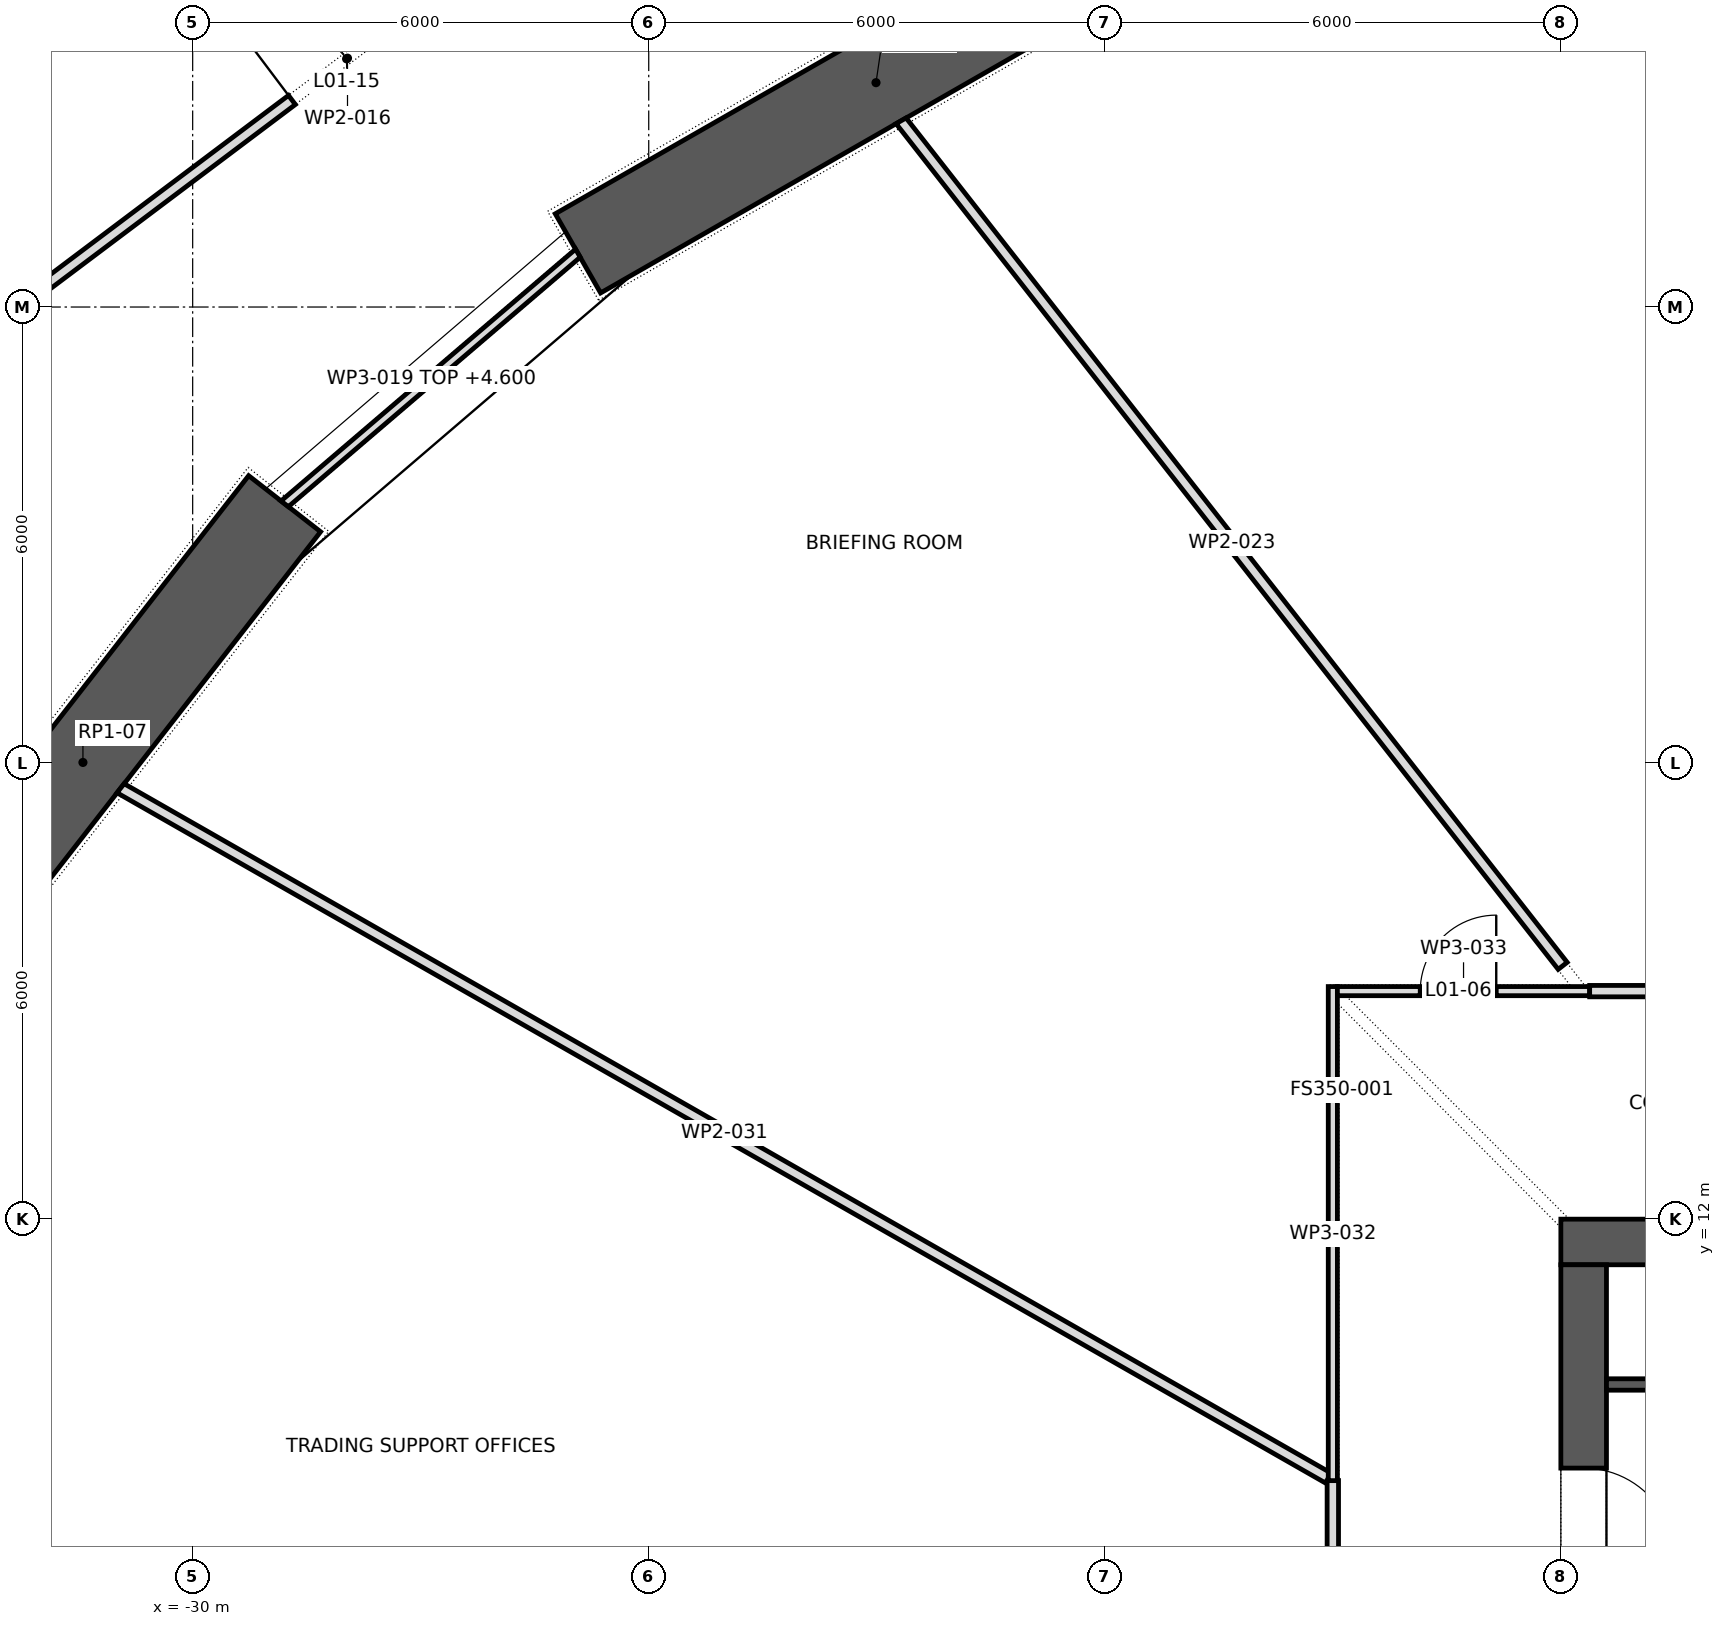
"""IFC4 building model, lengths in metres.
Left out: names, types, materials, properties, quantities, classifications, styles, units other than length and angle.
Written with IfcOpenShell. Run it as: python <this file> out.ifc"""

import sys

from ifc_helpers import new_model, si_unit, direction, frame, frame_2d, origin, place, context, subcontext, project, spatial, polyline, rectangle, outline, extrude, element, fill, save


model = new_model("IFC4")
c1 = context("Model", 3, precision=1e-05, world=origin(), true_north=direction((0.0, 1.0)))
c2 = subcontext(c1, "Body", "Model", "MODEL_VIEW")
j1 = project(units=[si_unit("LENGTHUNIT", "METRE"), si_unit("PLANEANGLEUNIT", "RADIAN")], contexts=[c1])
p1 = place(None, origin())
s1 = spatial("IfcSite", under=j1, at=p1, CompositionType="ELEMENT")
p2 = place(p1, origin())
s2 = spatial("IfcBuilding", under=s1, at=p2, CompositionType="ELEMENT")
p3 = place(p2, frame((0.0, 0.0, 7.0)))
s3 = spatial("IfcBuildingStorey", under=s2, at=p3, CompositionType="ELEMENT", Elevation=7.0)
p4 = place(p3, frame((-17.089, 29.198, 0.0), z_axis=(0.0, 0.0, 1.0), x_axis=(-0.867760656864, -0.496982336103, 0.0)))
e1 = element("IfcWall", 1, at=p4, inside=s3, PredefinedType="SHEAR", context=c2, shape_type="SweptSolid", body=[
    extrude(rectangle(XDim=9.038, YDim=1.2, at=frame_2d((4.519, 0.0))), origin(), (0.0, 0.0, 1.0), 5.5),
])
p5 = place(p3, frame((-28.79, 21.412, 0.0), z_axis=(0.0, 0.0, 1.0), x_axis=(-0.614825322247, -0.788663314174, 0.0)))
e2 = element("IfcWall", 2, at=p5, inside=s3, PredefinedType="SHEAR", context=c2, shape_type="SweptSolid", body=[
    extrude(rectangle(XDim=8.632, YDim=1.2, at=frame_2d((4.316, 0.0))), origin(), (0.0, 0.0, 1.0), 5.5),
])
p6 = place(p3, frame((-12.0, 11.7, 0.0), z_axis=(0.0, 0.0, 1.0), x_axis=(1.0, 0.0, 0.0)))
e3 = element("IfcWall", 3, at=p6, inside=s3, PredefinedType="SHEAR", context=c2, shape_type="SweptSolid", body=[
    extrude(rectangle(XDim=24.0, YDim=0.6, at=frame_2d((12.0, 0.0))), origin(), (0.0, 0.0, 1.0), 5.5),
])
p7 = place(p6, frame((9.025, 0.0, 0.0)))
e4 = element("IfcOpeningElement", 4, at=p7, cuts=e3, PredefinedType="OPENING", context=c2, shape_type="SweptSolid", body=[
    extrude(rectangle(XDim=0.8, YDim=2.1, at=frame_2d((0.4, 1.05))), frame((0.0, 0.312, 0.0), z_axis=(0.0, -1.0, 0.0), x_axis=(1.0, 0.0, 0.0)), (0.0, 0.0, 1.0), 0.624),
])
p8 = place(p6, frame((10.625, 0.0, 0.0)))
e5 = element("IfcOpeningElement", 5, at=p8, cuts=e3, PredefinedType="OPENING", context=c2, shape_type="SweptSolid", body=[
    extrude(rectangle(XDim=0.9, YDim=2.1, at=frame_2d((0.45, 1.05))), frame((0.0, 0.312, 0.0), z_axis=(0.0, -1.0, 0.0), x_axis=(1.0, 0.0, 0.0)), (0.0, 0.0, 1.0), 0.624),
])
p9 = place(p6, frame((4.2, 0.0, 0.0)))
e6 = element("IfcOpeningElement", 6, at=p9, cuts=e3, PredefinedType="OPENING", context=c2, shape_type="SweptSolid", body=[
    extrude(rectangle(XDim=0.8, YDim=2.1, at=frame_2d((0.4, 1.05))), frame((0.0, 0.312, 0.0), z_axis=(0.0, -1.0, 0.0), x_axis=(1.0, 0.0, 0.0)), (0.0, 0.0, 1.0), 0.624),
])
p10 = place(p6, frame((6.2, 0.0, 0.0)))
e7 = element("IfcOpeningElement", 7, at=p10, cuts=e3, PredefinedType="OPENING", context=c2, shape_type="SweptSolid", body=[
    extrude(rectangle(XDim=0.8, YDim=2.1, at=frame_2d((0.4, 1.05))), frame((0.0, 0.312, 0.0), z_axis=(0.0, -1.0, 0.0), x_axis=(1.0, 0.0, 0.0)), (0.0, 0.0, 1.0), 0.624),
])
p11 = place(p6, frame((7.7, 0.0, 0.0)))
e8 = element("IfcOpeningElement", 8, at=p11, cuts=e3, PredefinedType="OPENING", context=c2, shape_type="SweptSolid", body=[
    extrude(rectangle(XDim=0.8, YDim=2.1, at=frame_2d((0.4, 1.05))), frame((0.0, 0.312, 0.0), z_axis=(0.0, -1.0, 0.0), x_axis=(1.0, 0.0, 0.0)), (0.0, 0.0, 1.0), 0.624),
])
p12 = place(p6, frame((15.85, 0.0, 0.0)))
e9 = element("IfcOpeningElement", 9, at=p12, cuts=e3, PredefinedType="OPENING", context=c2, shape_type="SweptSolid", body=[
    extrude(rectangle(XDim=0.8, YDim=2.1, at=frame_2d((0.4, 1.05))), frame((0.0, 0.312, 0.0), z_axis=(0.0, -1.0, 0.0), x_axis=(1.0, 0.0, 0.0)), (0.0, 0.0, 1.0), 0.624),
])
p13 = place(p3, frame((-11.7, -11.4, 0.0), z_axis=(0.0, 0.0, 1.0), x_axis=(0.0, 1.0, 0.0)))
e10 = element("IfcWall", 10, at=p13, inside=s3, PredefinedType="SHEAR", context=c2, shape_type="SweptSolid", body=[
    extrude(rectangle(XDim=22.8, YDim=0.6, at=frame_2d((11.4, 0.0))), origin(), (0.0, 0.0, 1.0), 5.5),
])
p14 = place(p13, frame((10.2, 0.0, 0.0)))
e11 = element("IfcOpeningElement", 11, at=p14, cuts=e10, PredefinedType="OPENING", context=c2, shape_type="SweptSolid", body=[
    extrude(rectangle(XDim=2.4, YDim=2.1, at=frame_2d((1.2, 1.05))), frame((0.0, 0.312, 0.0), z_axis=(0.0, -1.0, 0.0), x_axis=(1.0, 0.0, 0.0)), (0.0, 0.0, 1.0), 0.624),
])
p15 = place(p13, frame((18.925, 0.0, 0.0)))
e12 = element("IfcOpeningElement", 12, at=p15, cuts=e10, PredefinedType="OPENING", context=c2, shape_type="SweptSolid", body=[
    extrude(rectangle(XDim=1.2, YDim=2.1, at=frame_2d((0.6, 1.05))), frame((0.0, 0.312, 0.0), z_axis=(0.0, -1.0, 0.0), x_axis=(1.0, 0.0, 0.0)), (0.0, 0.0, 1.0), 0.624),
])
p16 = place(p13, frame((2.675, 0.0, 0.0)))
e13 = element("IfcOpeningElement", 13, at=p16, cuts=e10, PredefinedType="OPENING", context=c2, shape_type="SweptSolid", body=[
    extrude(rectangle(XDim=1.2, YDim=2.1, at=frame_2d((0.6, 1.05))), frame((0.0, 0.312, 0.0), z_axis=(0.0, -1.0, 0.0), x_axis=(1.0, 0.0, 0.0)), (0.0, 0.0, 1.0), 0.624),
])
p17 = place(p3, frame((-11.4, 9.825, 0.0), z_axis=(0.0, 0.0, 1.0), x_axis=(1.0, 0.0, 0.0)))
e14 = element("IfcWall", 14, at=p17, inside=s3, PredefinedType="SHEAR", context=c2, shape_type="SweptSolid", body=[
    extrude(rectangle(XDim=8.0, YDim=0.15, at=frame_2d((4.0, 0.0))), origin(), (0.0, 0.0, 1.0), 5.15),
])
p18 = place(p3, frame((-32.225, 24.069, 0.0), z_axis=(0.0, 0.0, 1.0), x_axis=(0.799199975682, 0.601065220147, 0.0)))
e15 = element("IfcWall", 15, at=p18, inside=s3, PredefinedType="PARTITIONING", context=c2, shape_type="SweptSolid", body=[
    extrude(rectangle(XDim=10.666, YDim=0.15, at=frame_2d((5.333, 0.0))), origin(), (0.0, 0.0, 1.0), 5.15),
])
p19 = place(p18, frame((4.418, 0.0, 0.0)))
e16 = element("IfcOpeningElement", 16, at=p19, cuts=e15, PredefinedType="OPENING", context=c2, shape_type="SweptSolid", body=[
    extrude(rectangle(XDim=1.8, YDim=2.1, at=frame_2d((0.9, 1.05))), frame((0.0, 0.087, 0.0), z_axis=(0.0, -1.0, 0.0), x_axis=(1.0, 0.0, 0.0)), (0.0, 0.0, 1.0), 0.174),
])
p20 = place(p3, frame((-24.932, 24.708, 0.0), z_axis=(0.0, 0.0, 1.0), x_axis=(-0.760084552743, -0.649824185978, 0.0)))
e17 = element("IfcWall", 17, at=p20, inside=s3, PredefinedType="PARTITIONING", context=c2, shape_type="SweptSolid", body=[
    extrude(outline(polyline([(-0.011, -0.06), (5.087, -0.06), (5.063, 0.06), (0.011, 0.06), (-0.011, -0.06)])), origin(), (0.0, 0.0, 1.0), 4.6),
])
p21 = place(p3, frame((-20.68, 26.45, 0.0), z_axis=(0.0, 0.0, 1.0), x_axis=(0.616462106178, -0.787384576714, 0.0)))
e18 = element("IfcWall", 18, at=p21, inside=s3, PredefinedType="PARTITIONING", context=c2, shape_type="SweptSolid", body=[
    extrude(outline(polyline([(-0.011, -0.075), (14.119, -0.075), (14.119, 0.075), (0.011, 0.075), (-0.011, -0.075)])), origin(), (0.0, 0.0, 1.0), 5.15),
])
p22 = place(p3, frame((-15.0, 1.275, 0.0), z_axis=(0.0, 0.0, 1.0), x_axis=(0.0, 1.0, 0.0)))
e19 = element("IfcWall", 19, at=p22, inside=s3, PredefinedType="PARTITIONING", context=c2, shape_type="SweptSolid", body=[
    extrude(rectangle(XDim=7.286, YDim=0.15, at=frame_2d((3.643, 0.0))), origin(), (0.0, 0.0, 1.0), 5.15),
])
p23 = place(p22, frame((2.707, 0.0, 0.0)))
e20 = element("IfcOpeningElement", 20, at=p23, cuts=e19, PredefinedType="OPENING", context=c2, shape_type="SweptSolid", body=[
    extrude(rectangle(XDim=1.8, YDim=2.1, at=frame_2d((0.9, 1.05))), frame((0.0, 0.087, 0.0), z_axis=(0.0, -1.0, 0.0), x_axis=(1.0, 0.0, 0.0)), (0.0, 0.0, 1.0), 0.174),
])
p24 = place(p3, frame((-15.06, 8.594, 0.0), z_axis=(0.0, 0.0, 1.0), x_axis=(-0.868344936016, 0.495960756608, 0.0)))
e21 = element("IfcWall", 21, at=p24, inside=s3, PredefinedType="PARTITIONING", context=c2, shape_type="SweptSolid", body=[
    extrude(outline(polyline([(0.0, -0.075), (18.287, -0.075), (18.309, 0.075), (0.0, 0.075), (0.0, -0.075)])), origin(), (0.0, 0.0, 1.0), 5.15),
])
p25 = place(p3, frame((-15.0, 8.56, 0.0), z_axis=(0.0, 0.0, 1.0), x_axis=(0.0, 1.0, 0.0)))
e22 = element("IfcWall", 22, at=p25, inside=s3, PredefinedType="PARTITIONING", context=c2, shape_type="SweptSolid", body=[
    extrude(rectangle(XDim=6.5, YDim=0.12, at=frame_2d((3.25, 0.0))), origin(), (0.0, 0.0, 1.0), 5.15),
])
p26 = place(p3, frame((-14.94, 15.0, 0.0), z_axis=(0.0, 0.0, 1.0), x_axis=(1.0, 0.0, 0.0)))
e23 = element("IfcWall", 23, at=p26, inside=s3, PredefinedType="PARTITIONING", context=c2, shape_type="SweptSolid", body=[
    extrude(rectangle(XDim=3.319, YDim=0.12, at=frame_2d((1.66, 0.0))), origin(), (0.0, 0.0, 1.0), 5.15),
])
p27 = place(p26, frame((1.09, 0.0, 0.0)))
e24 = element("IfcOpeningElement", 24, at=p27, cuts=e23, PredefinedType="OPENING", context=c2, shape_type="SweptSolid", body=[
    extrude(rectangle(XDim=1.0, YDim=2.1, at=frame_2d((0.5, 1.05))), frame((0.0, 0.072, 0.0), z_axis=(0.0, -1.0, 0.0), x_axis=(1.0, 0.0, 0.0)), (0.0, 0.0, 1.0), 0.144),
])
p28 = place(p3, frame((-11.621, 15.0, 0.0), z_axis=(0.0, 0.0, 1.0), x_axis=(1.0, 0.0, 0.0)))
e25 = element("IfcWall", 25, at=p28, inside=s3, PredefinedType="PARTITIONING", context=c2, shape_type="SweptSolid", body=[
    extrude(rectangle(XDim=10.496, YDim=0.15, at=frame_2d((5.248, 0.0))), origin(), (0.0, 0.0, 1.0), 5.15),
])
p29 = place(p28, frame((4.252, 0.0, 0.0)))
e26 = element("IfcOpeningElement", 26, at=p29, cuts=e25, PredefinedType="OPENING", context=c2, shape_type="SweptSolid", body=[
    extrude(rectangle(XDim=1.8, YDim=2.1, at=frame_2d((0.9, 1.05))), frame((0.0, 0.087, 0.0), z_axis=(0.0, -1.0, 0.0), x_axis=(1.0, 0.0, 0.0)), (0.0, 0.0, 1.0), 0.174),
])
p30 = place(p15, frame((1.2, 0.0, 0.0), z_axis=(0.0, 0.0, 1.0), x_axis=(-1.0, 0.0, 0.0)))
e27 = element("IfcDoor", 27, at=p30, inside=s3, OperationType="SINGLE_SWING_LEFT", PredefinedType="DOOR", context=c2, shape_type="SweptSolid", body=[
    extrude(rectangle(XDim=1.2, YDim=2.1, at=frame_2d((0.6, 1.05))), frame((0.0, 0.025, 0.0), z_axis=(0.0, -1.0, 0.0), x_axis=(1.0, 0.0, 0.0)), (0.0, 0.0, 1.0), 0.05),
])
fill(e12, e27)
p31 = place(p27, origin())
e28 = element("IfcDoor", 28, at=p31, inside=s3, OperationType="SINGLE_SWING_LEFT", PredefinedType="DOOR", context=c2, shape_type="SweptSolid", body=[
    extrude(rectangle(XDim=1.0, YDim=2.1, at=frame_2d((0.5, 1.05))), frame((0.0, 0.025, 0.0), z_axis=(0.0, -1.0, 0.0), x_axis=(1.0, 0.0, 0.0)), (0.0, 0.0, 1.0), 0.05),
])
fill(e24, e28)
p32 = place(p19, origin())
e29 = element("IfcDoor", 29, at=p32, inside=s3, OperationType="DOUBLE_DOOR_SINGLE_SWING", PredefinedType="DOOR", context=c2, shape_type="SweptSolid", body=[
    extrude(rectangle(XDim=1.8, YDim=2.1, at=frame_2d((0.9, 1.05))), frame((0.0, 0.025, 0.0), z_axis=(0.0, -1.0, 0.0), x_axis=(1.0, 0.0, 0.0)), (0.0, 0.0, 1.0), 0.05),
])
fill(e16, e29)
save(model, sys.argv[1])
